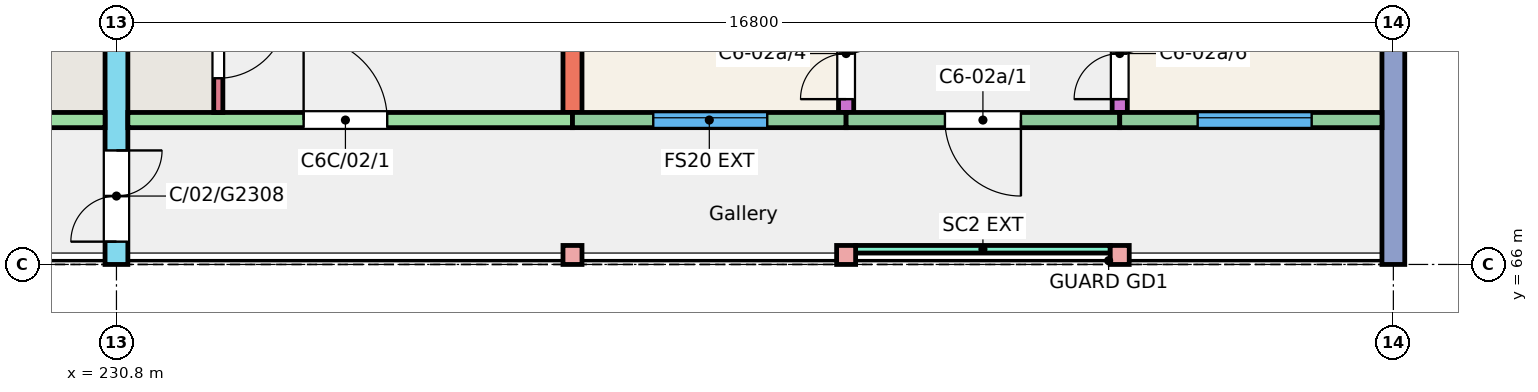
"""IFC4 building model, lengths in metres.
Left out: names, types, materials, properties, quantities, classifications, styles, units other than length and angle.
Written with IfcOpenShell. Run it as: python <this file> out.ifc"""

import sys

from ifc_helpers import new_model, si_unit, direction, frame, frame_2d, origin, origin_2d, place, context, subcontext, project, spatial, rectangle, extrude, element, fill, save


model = new_model("IFC4")
c1 = context("Model", 3, precision=1e-05, world=origin(), true_north=direction((0.0, 1.0)))
c2 = subcontext(c1, "Body", "Model", "MODEL_VIEW")
j1 = project(units=[si_unit("LENGTHUNIT", "METRE"), si_unit("PLANEANGLEUNIT", "RADIAN")], contexts=[c1])
p1 = place(None, origin())
s1 = spatial("IfcSite", under=j1, at=p1, CompositionType="ELEMENT")
p2 = place(p1, origin())
s2 = spatial("IfcBuilding", under=s1, at=p2, CompositionType="ELEMENT")
p3 = place(p2, frame((0.0, 0.0, 6.0)))
s3 = spatial("IfcBuildingStorey", under=s2, at=p3, CompositionType="ELEMENT", Elevation=6.0)
p4 = place(p3, frame((230.8, 66.0, 0.0), z_axis=(0.0, 0.0, 1.0), x_axis=(0.0, 1.0, 0.0)))
e1 = element("IfcWall", 1, at=p4, inside=s3, PredefinedType="SHEAR", context=c2, shape_type="SweptSolid", body=[
    extrude(rectangle(XDim=11.0, YDim=0.3, at=frame_2d((5.5, 0.0))), origin(), (0.0, 0.0, 1.0), 3.0),
])
p5 = place(p4, frame((0.3, 0.0, 0.0)))
e2 = element("IfcOpeningElement", 2, at=p5, cuts=e1, PredefinedType="OPENING", context=c2, shape_type="SweptSolid", body=[
    extrude(rectangle(XDim=1.2, YDim=2.1, at=frame_2d((0.6, 1.05))), frame((0.0, 0.16, 0.0), z_axis=(0.0, -1.0, 0.0), x_axis=(1.0, 0.0, 0.0)), (0.0, 0.0, 1.0), 0.32),
])
p6 = place(p3, frame((236.8, 68.0, 0.0), z_axis=(0.0, 0.0, 1.0), x_axis=(0.0, 1.0, 0.0)))
e3 = element("IfcWall", 3, at=p6, inside=s3, PredefinedType="SHEAR", context=c2, shape_type="SweptSolid", body=[
    extrude(rectangle(XDim=9.0, YDim=0.25, at=frame_2d((4.5, 0.0))), origin(), (0.0, 0.0, 1.0), 3.0),
])
p7 = place(p3, frame((240.4, 68.0, 0.0), z_axis=(0.0, 0.0, 1.0), x_axis=(0.0, 1.0, 0.0)))
e4 = element("IfcWall", 4, at=p7, inside=s3, PredefinedType="SHEAR", context=c2, shape_type="SweptSolid", body=[
    extrude(rectangle(XDim=9.0, YDim=0.2, at=frame_2d((4.5, 0.0))), origin(), (0.0, 0.0, 1.0), 3.0),
])
p8 = place(p7, frame((0.175, 0.0, 0.0)))
e5 = element("IfcOpeningElement", 5, at=p8, cuts=e4, PredefinedType="OPENING", context=c2, shape_type="SweptSolid", body=[
    extrude(rectangle(XDim=1.2, YDim=2.1, at=frame_2d((0.6, 1.05))), frame((0.0, 0.11, 0.0), z_axis=(0.0, -1.0, 0.0), x_axis=(1.0, 0.0, 0.0)), (0.0, 0.0, 1.0), 0.22),
])
p9 = place(p7, frame((6.4, 0.0, 0.0)))
e6 = element("IfcOpeningElement", 6, at=p9, cuts=e4, PredefinedType="OPENING", context=c2, shape_type="SweptSolid", body=[
    extrude(rectangle(XDim=1.2, YDim=2.1, at=frame_2d((0.6, 1.05))), frame((0.0, 0.11, 0.0), z_axis=(0.0, -1.0, 0.0), x_axis=(1.0, 0.0, 0.0)), (0.0, 0.0, 1.0), 0.22),
])
p10 = place(p3, frame((244.0, 68.0, 0.0), z_axis=(0.0, 0.0, 1.0), x_axis=(0.0, 1.0, 0.0)))
e7 = element("IfcWall", 7, at=p10, inside=s3, PredefinedType="SHEAR", context=c2, shape_type="SweptSolid", body=[
    extrude(rectangle(XDim=9.0, YDim=0.2, at=frame_2d((4.5, 0.0))), origin(), (0.0, 0.0, 1.0), 3.0),
])
p11 = place(p10, frame((0.175, 0.0, 0.0)))
e8 = element("IfcOpeningElement", 8, at=p11, cuts=e7, PredefinedType="OPENING", context=c2, shape_type="SweptSolid", body=[
    extrude(rectangle(XDim=1.2, YDim=2.1, at=frame_2d((0.6, 1.05))), frame((0.0, 0.11, 0.0), z_axis=(0.0, -1.0, 0.0), x_axis=(1.0, 0.0, 0.0)), (0.0, 0.0, 1.0), 0.22),
])
p12 = place(p10, frame((6.4, 0.0, 0.0)))
e9 = element("IfcOpeningElement", 9, at=p12, cuts=e7, PredefinedType="OPENING", context=c2, shape_type="SweptSolid", body=[
    extrude(rectangle(XDim=1.2, YDim=2.1, at=frame_2d((0.6, 1.05))), frame((0.0, 0.11, 0.0), z_axis=(0.0, -1.0, 0.0), x_axis=(1.0, 0.0, 0.0)), (0.0, 0.0, 1.0), 0.22),
])
p13 = place(p3, frame((247.6, 66.0, 0.0), z_axis=(0.0, 0.0, 1.0), x_axis=(0.0, 1.0, 0.0)))
e10 = element("IfcWall", 10, at=p13, inside=s3, PredefinedType="SHEAR", context=c2, shape_type="SweptSolid", body=[
    extrude(rectangle(XDim=11.0, YDim=0.3, at=frame_2d((5.5, 0.0))), origin(), (0.0, 0.0, 1.0), 3.0),
])
p14 = place(p13, frame((3.55, 0.0, 0.9)))
e11 = element("IfcOpeningElement", 11, at=p14, cuts=e10, PredefinedType="OPENING", context=c2, shape_type="SweptSolid", body=[
    extrude(rectangle(XDim=1.5, YDim=1.5, at=frame_2d((0.75, 0.75))), frame((0.0, 0.16, 0.0), z_axis=(0.0, -1.0, 0.0), x_axis=(1.0, 0.0, 0.0)), (0.0, 0.0, 1.0), 0.32),
])
p15 = place(p13, frame((8.105, 0.0, 0.9)))
e12 = element("IfcOpeningElement", 12, at=p15, cuts=e10, PredefinedType="OPENING", context=c2, shape_type="SweptSolid", body=[
    extrude(rectangle(XDim=1.5, YDim=1.5, at=frame_2d((0.75, 0.75))), frame((0.0, 0.16, 0.0), z_axis=(0.0, -1.0, 0.0), x_axis=(1.0, 0.0, 0.0)), (0.0, 0.0, 1.0), 0.32),
])
p16 = place(p3, frame((224.8, 67.9, 0.0), z_axis=(0.0, 0.0, 1.0), x_axis=(1.0, 0.0, 0.0)))
e13 = element("IfcWall", 13, at=p16, inside=s3, PredefinedType="SHEAR", context=c2, shape_type="SweptSolid", body=[
    extrude(rectangle(XDim=5.85, YDim=0.2, at=frame_2d((2.925, 0.0))), origin(), (0.0, 0.0, 1.0), 3.0),
])
p17 = place(p16, frame((2.438, 0.0, 0.0)))
e14 = element("IfcOpeningElement", 14, at=p17, cuts=e13, PredefinedType="OPENING", context=c2, shape_type="SweptSolid", body=[
    extrude(rectangle(XDim=1.1, YDim=2.1, at=frame_2d((0.55, 1.05))), frame((0.0, 0.11, 0.0), z_axis=(0.0, -1.0, 0.0), x_axis=(1.0, 0.0, 0.0)), (0.0, 0.0, 1.0), 0.22),
])
p18 = place(p3, frame((230.95, 67.9, 0.0), z_axis=(0.0, 0.0, 1.0), x_axis=(1.0, 0.0, 0.0)))
e15 = element("IfcWall", 15, at=p18, inside=s3, PredefinedType="SHEAR", context=c2, shape_type="SweptSolid", body=[
    extrude(rectangle(XDim=5.85, YDim=0.2, at=frame_2d((2.925, 0.0))), origin(), (0.0, 0.0, 1.0), 3.0),
])
p19 = place(p18, frame((2.312, 0.0, 0.0)))
e16 = element("IfcOpeningElement", 16, at=p19, cuts=e15, PredefinedType="OPENING", context=c2, shape_type="SweptSolid", body=[
    extrude(rectangle(XDim=1.1, YDim=2.1, at=frame_2d((0.55, 1.05))), frame((0.0, 0.11, 0.0), z_axis=(0.0, -1.0, 0.0), x_axis=(1.0, 0.0, 0.0)), (0.0, 0.0, 1.0), 0.22),
])
p20 = place(p3, frame((232.14, 68.0, 0.0), z_axis=(0.0, 0.0, 1.0), x_axis=(0.0, 1.0, 0.0)))
e17 = element("IfcWall", 17, at=p20, inside=s3, PredefinedType="SHEAR", context=c2, shape_type="SweptSolid", body=[
    extrude(rectangle(XDim=1.72, YDim=0.12, at=frame_2d((0.86, 0.0))), origin(), (0.0, 0.0, 1.0), 3.0),
])
p21 = place(p20, frame((0.45, 0.0, 0.0)))
e18 = element("IfcOpeningElement", 18, at=p21, cuts=e17, PredefinedType="OPENING", context=c2, shape_type="SweptSolid", body=[
    extrude(rectangle(XDim=0.9, YDim=2.1, at=frame_2d((0.45, 1.05))), frame((0.0, 0.07, 0.0), z_axis=(0.0, -1.0, 0.0), x_axis=(1.0, 0.0, 0.0)), (0.0, 0.0, 1.0), 0.14),
])
p22 = place(p3, frame((236.8, 67.9, 0.0), z_axis=(0.0, 0.0, 1.0), x_axis=(1.0, 0.0, 0.0)))
e19 = element("IfcWall", 19, at=p22, inside=s3, PredefinedType="SOLIDWALL", context=c2, shape_type="SweptSolid", body=[
    extrude(rectangle(XDim=3.6, YDim=0.2, at=frame_2d((1.8, 0.0))), origin(), (0.0, 0.0, 1.0), 3.0),
])
p23 = place(p22, frame((1.062, 0.0, 0.9)))
e20 = element("IfcOpeningElement", 20, at=p23, cuts=e19, PredefinedType="OPENING", context=c2, shape_type="SweptSolid", body=[
    extrude(rectangle(XDim=1.5, YDim=1.5, at=frame_2d((0.75, 0.75))), frame((0.0, 0.11, 0.0), z_axis=(0.0, -1.0, 0.0), x_axis=(1.0, 0.0, 0.0)), (0.0, 0.0, 1.0), 0.22),
])
p24 = place(p3, frame((240.4, 67.9, 0.0), z_axis=(0.0, 0.0, 1.0), x_axis=(1.0, 0.0, 0.0)))
e21 = element("IfcWall", 21, at=p24, inside=s3, PredefinedType="SOLIDWALL", context=c2, shape_type="SweptSolid", body=[
    extrude(rectangle(XDim=3.6, YDim=0.2, at=frame_2d((1.8, 0.0))), origin(), (0.0, 0.0, 1.0), 3.0),
])
p25 = place(p24, frame((1.3, 0.0, 0.0)))
e22 = element("IfcOpeningElement", 22, at=p25, cuts=e21, PredefinedType="OPENING", context=c2, shape_type="SweptSolid", body=[
    extrude(rectangle(XDim=1.0, YDim=2.1, at=frame_2d((0.5, 1.05))), frame((0.0, 0.11, 0.0), z_axis=(0.0, -1.0, 0.0), x_axis=(1.0, 0.0, 0.0)), (0.0, 0.0, 1.0), 0.22),
])
p26 = place(p3, frame((244.0, 67.9, 0.0), z_axis=(0.0, 0.0, 1.0), x_axis=(1.0, 0.0, 0.0)))
e23 = element("IfcWall", 23, at=p26, inside=s3, PredefinedType="SOLIDWALL", context=c2, shape_type="SweptSolid", body=[
    extrude(rectangle(XDim=3.45, YDim=0.2, at=frame_2d((1.725, 0.0))), origin(), (0.0, 0.0, 1.0), 3.0),
])
p27 = place(p26, frame((1.025, 0.0, 0.9)))
e24 = element("IfcOpeningElement", 24, at=p27, cuts=e23, PredefinedType="OPENING", context=c2, shape_type="SweptSolid", body=[
    extrude(rectangle(XDim=1.5, YDim=1.5, at=frame_2d((0.75, 0.75))), frame((0.0, 0.11, 0.0), z_axis=(0.0, -1.0, 0.0), x_axis=(1.0, 0.0, 0.0)), (0.0, 0.0, 1.0), 0.22),
])
for number, where, z_axis, x_axis in (
    (25, (236.8, 66.125, 0.0), (0.0, 0.0, 1.0), (1.0, 0.0, 0.0)),
    (26, (240.4, 66.125, 0.0), (0.0, 0.0, 1.0), (1.0, 0.0, 0.0)),
    (27, (244.0, 66.125, 0.0), (0.0, 0.0, 1.0), (1.0, 0.0, 0.0)),
):
    element("IfcColumn", number, at=place(p3, frame(where, z_axis=z_axis, x_axis=x_axis)), inside=s3, PredefinedType="COLUMN", context=c2, shape_type="SweptSolid", body=[
        extrude(rectangle(XDim=0.25, YDim=0.25, at=origin_2d()), origin(), (0.0, 0.0, 1.0), 3.0),
    ])
p28 = place(p3, frame((240.525, 66.2, 0.0), z_axis=(0.0, 0.0, 1.0), x_axis=(1.0, 0.0, 0.0)))
e28 = element("IfcWall", 28, at=p28, inside=s3, PredefinedType="SOLIDWALL", context=c2, shape_type="SweptSolid", body=[
    extrude(rectangle(XDim=3.35, YDim=0.1, at=frame_2d((1.675, 0.0))), origin(), (0.0, 0.0, 1.0), 2.45),
])
p29 = place(p23, origin())
e29 = element("IfcWindow", 29, at=p29, inside=s3, PartitioningType="SINGLE_PANEL", PredefinedType="WINDOW", context=c2, shape_type="SweptSolid", body=[
    extrude(rectangle(XDim=1.5, YDim=1.5, at=frame_2d((0.75, 0.75))), frame((0.0, 0.06, 0.0), z_axis=(0.0, -1.0, 0.0), x_axis=(1.0, 0.0, 0.0)), (0.0, 0.0, 1.0), 0.06),
])
fill(e20, e29)
p30 = place(p27, origin())
e30 = element("IfcWindow", 30, at=p30, inside=s3, PartitioningType="SINGLE_PANEL", PredefinedType="WINDOW", context=c2, shape_type="SweptSolid", body=[
    extrude(rectangle(XDim=1.5, YDim=1.5, at=frame_2d((0.75, 0.75))), frame((0.0, 0.06, 0.0), z_axis=(0.0, -1.0, 0.0), x_axis=(1.0, 0.0, 0.0)), (0.0, 0.0, 1.0), 0.06),
])
fill(e24, e30)
p31 = place(p25, origin())
e31 = element("IfcDoor", 31, at=p31, inside=s3, OperationType="SINGLE_SWING_RIGHT", PredefinedType="DOOR", context=c2, shape_type="SweptSolid", body=[
    extrude(rectangle(XDim=1.0, YDim=2.1, at=frame_2d((0.5, 1.05))), frame((0.0, 0.025, 0.0), z_axis=(0.0, -1.0, 0.0), x_axis=(1.0, 0.0, 0.0)), (0.0, 0.0, 1.0), 0.05),
])
fill(e22, e31)
p32 = place(p8, origin())
e32 = element("IfcDoor", 32, at=p32, inside=s3, OperationType="DOUBLE_DOOR_SINGLE_SWING", PredefinedType="DOOR", context=c2, shape_type="SweptSolid", body=[
    extrude(rectangle(XDim=1.2, YDim=2.1, at=frame_2d((0.6, 1.05))), frame((0.0, 0.025, 0.0), z_axis=(0.0, -1.0, 0.0), x_axis=(1.0, 0.0, 0.0)), (0.0, 0.0, 1.0), 0.05),
])
fill(e5, e32)
p33 = place(p11, origin())
e33 = element("IfcDoor", 33, at=p33, inside=s3, OperationType="DOUBLE_DOOR_SINGLE_SWING", PredefinedType="DOOR", context=c2, shape_type="SweptSolid", body=[
    extrude(rectangle(XDim=1.2, YDim=2.1, at=frame_2d((0.6, 1.05))), frame((0.0, 0.025, 0.0), z_axis=(0.0, -1.0, 0.0), x_axis=(1.0, 0.0, 0.0)), (0.0, 0.0, 1.0), 0.05),
])
fill(e8, e33)
p34 = place(p19, origin())
e34 = element("IfcDoor", 34, at=p34, inside=s3, OperationType="SINGLE_SWING_LEFT", PredefinedType="DOOR", context=c2, shape_type="SweptSolid", body=[
    extrude(rectangle(XDim=1.1, YDim=2.1, at=frame_2d((0.55, 1.05))), frame((0.0, 0.025, 0.0), z_axis=(0.0, -1.0, 0.0), x_axis=(1.0, 0.0, 0.0)), (0.0, 0.0, 1.0), 0.05),
])
fill(e16, e34)
p35 = place(p21, origin())
e35 = element("IfcDoor", 35, at=p35, inside=s3, OperationType="SINGLE_SWING_RIGHT", PredefinedType="DOOR", context=c2, shape_type="SweptSolid", body=[
    extrude(rectangle(XDim=0.9, YDim=2.1, at=frame_2d((0.45, 1.05))), frame((0.0, 0.025, 0.0), z_axis=(0.0, -1.0, 0.0), x_axis=(1.0, 0.0, 0.0)), (0.0, 0.0, 1.0), 0.05),
])
fill(e18, e35)
p36 = place(p5, origin())
e36 = element("IfcDoor", 36, at=p36, inside=s3, OperationType="DOUBLE_DOOR_SINGLE_SWING", PredefinedType="DOOR", context=c2, shape_type="SweptSolid", body=[
    extrude(rectangle(XDim=1.2, YDim=2.1, at=frame_2d((0.6, 1.05))), frame((0.0, 0.025, 0.0), z_axis=(0.0, -1.0, 0.0), x_axis=(1.0, 0.0, 0.0)), (0.0, 0.0, 1.0), 0.05),
])
fill(e2, e36)
save(model, sys.argv[1])
